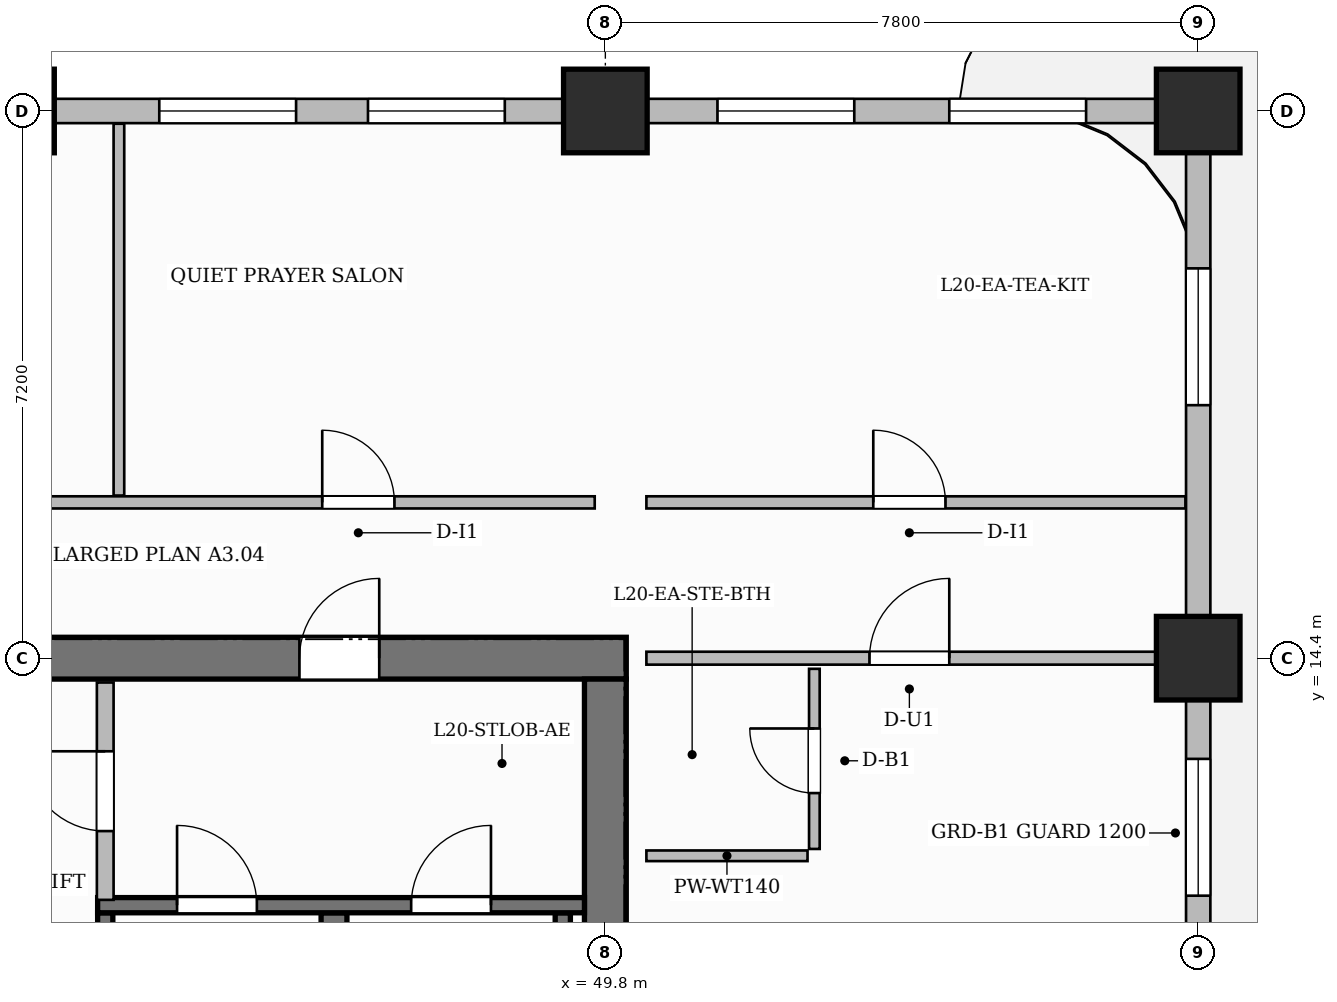
"""IFC4 building model, lengths in metres.
Left out: names, types, materials, properties, quantities, classifications, styles, units other than length and angle.
Written with IfcOpenShell. Run it as: python <this file> out.ifc"""

import sys

from ifc_helpers import new_model, si_unit, direction, frame, frame_2d, origin, origin_2d, place, context, subcontext, project, spatial, rectangle, extrude, source, transform, mapped, element, fill, save


model = new_model("IFC4")
c1 = context("Model", 3, precision=1e-05, world=origin(), true_north=direction((0.0, 1.0)))
c2 = subcontext(c1, "Body", "Model", "MODEL_VIEW")
j1 = project(units=[si_unit("LENGTHUNIT", "METRE"), si_unit("PLANEANGLEUNIT", "RADIAN")], contexts=[c1])
p1 = place(None, origin())
s1 = spatial("IfcSite", under=j1, at=p1, CompositionType="ELEMENT")
p2 = place(p1, origin())
s2 = spatial("IfcBuilding", under=s1, at=p2, CompositionType="ELEMENT")
p3 = place(p2, frame((0.0, 0.0, 84.2)))
s3 = spatial("IfcBuildingStorey", under=s2, at=p3, CompositionType="ELEMENT", Elevation=84.2)
p4 = place(p3, frame((34.525, 14.4, 0.0), z_axis=(0.0, 0.0, 1.0), x_axis=(1.0, 0.0, 0.0)))
e1 = element("IfcWall", 1, at=p4, inside=s3, PredefinedType="SHEAR", context=c2, shape_type="SweptSolid", body=[
    extrude(rectangle(XDim=15.55, YDim=0.55, at=frame_2d((7.775, 0.0))), origin(), (0.0, 0.0, 1.0), 3.7),
])
p5 = place(p4, frame((5.405, 0.0, 0.0)))
e2 = element("IfcOpeningElement", 2, at=p5, cuts=e1, PredefinedType="OPENING", context=c2, shape_type="SweptSolid", body=[
    extrude(rectangle(XDim=1.5, YDim=2.2, at=frame_2d((0.75, 1.1))), frame((0.0, 0.285, 0.0), z_axis=(0.0, -1.0, 0.0), x_axis=(1.0, 0.0, 0.0)), (0.0, 0.0, 1.0), 0.57),
])
p6 = place(p4, frame((1.62, 0.0, 0.0)))
e3 = element("IfcOpeningElement", 3, at=p6, cuts=e1, PredefinedType="OPENING", context=c2, shape_type="SweptSolid", body=[
    extrude(rectangle(XDim=1.05, YDim=2.15, at=frame_2d((0.525, 1.075))), frame((0.0, 0.285, 0.0), z_axis=(0.0, -1.0, 0.0), x_axis=(1.0, 0.0, 0.0)), (0.0, 0.0, 1.0), 0.57),
])
p7 = place(p4, frame((11.25, 0.0, 0.0)))
e4 = element("IfcOpeningElement", 4, at=p7, cuts=e1, PredefinedType="OPENING", context=c2, shape_type="SweptSolid", body=[
    extrude(rectangle(XDim=1.05, YDim=2.15, at=frame_2d((0.525, 1.075))), frame((0.0, 0.285, 0.0), z_axis=(0.0, -1.0, 0.0), x_axis=(1.0, 0.0, 0.0)), (0.0, 0.0, 1.0), 0.57),
])
p8 = place(p3, frame((49.8, 3.875, 0.0), z_axis=(0.0, 0.0, 1.0), x_axis=(0.0, 1.0, 0.0)))
e5 = element("IfcWall", 5, at=p8, inside=s3, PredefinedType="SHEAR", context=c2, shape_type="SweptSolid", body=[
    extrude(rectangle(XDim=10.25, YDim=0.55, at=frame_2d((5.125, 0.0))), origin(), (0.0, 0.0, 1.0), 3.7),
])
m1 = source(origin(), c2, "Body", "SweptSolid", [
    extrude(rectangle(XDim=1.1, YDim=1.1, at=origin_2d()), origin(), (0.0, 0.0, 1.0), 3.7),
])
for number, where, z_axis, x_axis in (
    (6, (42.0, 21.6, 0.0), (0.0, 0.0, 1.0), (1.0, 0.0, 0.0)),
    (7, (49.8, 21.6, 0.0), (0.0, 0.0, 1.0), (1.0, 0.0, 0.0)),
    (8, (57.6, 14.4, 0.0), (0.0, 0.0, 1.0), (1.0, 0.0, 0.0)),
    (9, (57.6, 21.6, 0.0), (0.0, 0.0, 1.0), (1.0, 0.0, 0.0)),
):
    element("IfcColumn", number, at=place(p3, frame(where, z_axis=z_axis, x_axis=x_axis)), inside=s3, PredefinedType="COLUMN", context=c2, shape_type="MappedRepresentation", body=[
        mapped(m1, transform((0.0, 0.0, 0.0), scale=1.0)),
    ])
p9 = place(p3, frame((43.22, 4.1, 0.0), z_axis=(0.0, 0.0, 1.0), x_axis=(0.0, 1.0, 0.0)))
e10 = element("IfcWall", 10, at=p9, inside=s3, PredefinedType="SHEAR", context=c2, shape_type="SweptSolid", body=[
    extrude(rectangle(XDim=6.95, YDim=0.2, at=frame_2d((3.475, 0.0))), origin(), (0.0, 0.0, 1.0), 3.7),
])
p10 = place(p3, frame((46.23, 4.1, 0.0), z_axis=(0.0, 0.0, 1.0), x_axis=(0.0, 1.0, 0.0)))
e11 = element("IfcWall", 11, at=p10, inside=s3, PredefinedType="SHEAR", context=c2, shape_type="SweptSolid", body=[
    extrude(rectangle(XDim=6.95, YDim=0.34, at=frame_2d((3.475, 0.0))), origin(), (0.0, 0.0, 1.0), 3.7),
])
p11 = place(p3, frame((49.24, 4.1, 0.0), z_axis=(0.0, 0.0, 1.0), x_axis=(0.0, 1.0, 0.0)))
e12 = element("IfcWall", 12, at=p11, inside=s3, PredefinedType="SHEAR", context=c2, shape_type="SweptSolid", body=[
    extrude(rectangle(XDim=6.95, YDim=0.2, at=frame_2d((3.475, 0.0))), origin(), (0.0, 0.0, 1.0), 3.7),
])
p12 = place(p3, frame((43.12, 11.15, 0.0), z_axis=(0.0, 0.0, 1.0), x_axis=(1.0, 0.0, 0.0)))
e13 = element("IfcWall", 13, at=p12, inside=s3, PredefinedType="SHEAR", context=c2, shape_type="SweptSolid", body=[
    extrude(rectangle(XDim=6.405, YDim=0.2, at=frame_2d((3.202, 0.0))), origin(), (0.0, 0.0, 1.0), 3.7),
])
p13 = place(p12, frame((1.045, 0.0, 0.0)))
e14 = element("IfcOpeningElement", 14, at=p13, cuts=e13, PredefinedType="OPENING", context=c2, shape_type="SweptSolid", body=[
    extrude(rectangle(XDim=1.05, YDim=2.2, at=frame_2d((0.525, 1.1))), frame((0.0, 0.11, 0.0), z_axis=(0.0, -1.0, 0.0), x_axis=(1.0, 0.0, 0.0)), (0.0, 0.0, 1.0), 0.22),
])
p14 = place(p12, frame((4.125, 0.0, 0.0)))
e15 = element("IfcOpeningElement", 15, at=p14, cuts=e13, PredefinedType="OPENING", context=c2, shape_type="SweptSolid", body=[
    extrude(rectangle(XDim=1.05, YDim=2.2, at=frame_2d((0.525, 1.1))), frame((0.0, 0.11, 0.0), z_axis=(0.0, -1.0, 0.0), x_axis=(1.0, 0.0, 0.0)), (0.0, 0.0, 1.0), 0.22),
])
p15 = place(p3, frame((43.22, 11.22, 0.0), z_axis=(0.0, 0.0, 1.0), x_axis=(0.0, 1.0, 0.0)))
e16 = element("IfcWall", 16, at=p15, inside=s3, PredefinedType="PARTITIONING", context=c2, shape_type="SweptSolid", body=[
    extrude(rectangle(XDim=2.86, YDim=0.22, at=frame_2d((1.43, 0.0))), origin(), (0.0, 0.0, 1.0), 3.45),
])
p16 = place(p15, frame((0.905, 0.0, 0.0)))
e17 = element("IfcOpeningElement", 17, at=p16, cuts=e16, PredefinedType="OPENING", context=c2, shape_type="SweptSolid", body=[
    extrude(rectangle(XDim=1.05, YDim=2.15, at=frame_2d((0.525, 1.075))), frame((0.0, 0.12, 0.0), z_axis=(0.0, -1.0, 0.0), x_axis=(1.0, 0.0, 0.0)), (0.0, 0.0, 1.0), 0.24),
])
p17 = place(p3, frame((32.19, 16.45, 0.0), z_axis=(0.0, 0.0, 1.0), x_axis=(1.0, 0.0, 0.0)))
e18 = element("IfcWall", 18, at=p17, inside=s3, PredefinedType="PARTITIONING", context=c2, shape_type="SweptSolid", body=[
    extrude(rectangle(XDim=17.47, YDim=0.16, at=frame_2d((8.735, 0.0))), origin(), (0.0, 0.0, 1.0), 3.45),
])
p18 = place(p17, frame((1.235, 0.0, 0.0)))
e19 = element("IfcOpeningElement", 19, at=p18, cuts=e18, PredefinedType="OPENING", context=c2, shape_type="SweptSolid", body=[
    extrude(rectangle(XDim=0.85, YDim=2.1, at=frame_2d((0.425, 1.05))), frame((0.0, 0.09, 0.0), z_axis=(0.0, -1.0, 0.0), x_axis=(1.0, 0.0, 0.0)), (0.0, 0.0, 1.0), 0.18),
])
p19 = place(p17, frame((6.61, 0.0, 0.0)))
e20 = element("IfcOpeningElement", 20, at=p19, cuts=e18, PredefinedType="OPENING", context=c2, shape_type="SweptSolid", body=[
    extrude(rectangle(XDim=1.4, YDim=2.35, at=frame_2d((0.7, 1.175))), frame((0.0, 0.09, 0.0), z_axis=(0.0, -1.0, 0.0), x_axis=(1.0, 0.0, 0.0)), (0.0, 0.0, 1.0), 0.18),
])
p20 = place(p17, frame((13.885, 0.0, 0.0)))
e21 = element("IfcOpeningElement", 21, at=p20, cuts=e18, PredefinedType="OPENING", context=c2, shape_type="SweptSolid", body=[
    extrude(rectangle(XDim=0.95, YDim=2.15, at=frame_2d((0.475, 1.075))), frame((0.0, 0.09, 0.0), z_axis=(0.0, -1.0, 0.0), x_axis=(1.0, 0.0, 0.0)), (0.0, 0.0, 1.0), 0.18),
])
p21 = place(p3, frame((50.34, 14.4, 0.0), z_axis=(0.0, 0.0, 1.0), x_axis=(1.0, 0.0, 0.0)))
e22 = element("IfcWall", 22, at=p21, inside=s3, PredefinedType="PARTITIONING", context=c2, shape_type="SweptSolid", body=[
    extrude(rectangle(XDim=7.07, YDim=0.17, at=frame_2d((3.535, 0.0))), origin(), (0.0, 0.0, 1.0), 2.885),
])
p22 = place(p21, frame((2.935, 0.0, 0.0)))
e23 = element("IfcOpeningElement", 23, at=p22, cuts=e22, PredefinedType="OPENING", context=c2, shape_type="SweptSolid", body=[
    extrude(rectangle(XDim=1.05, YDim=2.25, at=frame_2d((0.525, 1.125))), frame((0.0, 0.095, 0.0), z_axis=(0.0, -1.0, 0.0), x_axis=(1.0, 0.0, 0.0)), (0.0, 0.0, 1.0), 0.19),
])
p23 = place(p3, frame((50.34, 16.45, 0.0), z_axis=(0.0, 0.0, 1.0), x_axis=(1.0, 0.0, 0.0)))
e24 = element("IfcWall", 24, at=p23, inside=s3, PredefinedType="PARTITIONING", context=c2, shape_type="SweptSolid", body=[
    extrude(rectangle(XDim=7.092, YDim=0.16, at=frame_2d((3.546, 0.0))), origin(), (0.0, 0.0, 1.0), 3.45),
])
p24 = place(p23, frame((2.985, 0.0, 0.0)))
e25 = element("IfcOpeningElement", 25, at=p24, cuts=e24, PredefinedType="OPENING", context=c2, shape_type="SweptSolid", body=[
    extrude(rectangle(XDim=0.95, YDim=2.15, at=frame_2d((0.475, 1.075))), frame((0.0, 0.09, 0.0), z_axis=(0.0, -1.0, 0.0), x_axis=(1.0, 0.0, 0.0)), (0.0, 0.0, 1.0), 0.18),
])
p25 = place(p3, frame((52.55, 11.89, 0.0), z_axis=(0.0, 0.0, 1.0), x_axis=(0.0, 1.0, 0.0)))
e26 = element("IfcWall", 26, at=p25, inside=s3, PredefinedType="PARTITIONING", context=c2, shape_type="SweptSolid", body=[
    extrude(rectangle(XDim=2.37, YDim=0.14, at=frame_2d((1.185, 0.0))), origin(), (0.0, 0.0, 1.0), 3.45),
])
p26 = place(p25, frame((0.735, 0.0, 0.0)))
e27 = element("IfcOpeningElement", 27, at=p26, cuts=e26, PredefinedType="OPENING", context=c2, shape_type="SweptSolid", body=[
    extrude(rectangle(XDim=0.85, YDim=2.1, at=frame_2d((0.425, 1.05))), frame((0.0, 0.08, 0.0), z_axis=(0.0, -1.0, 0.0), x_axis=(1.0, 0.0, 0.0)), (0.0, 0.0, 1.0), 0.16),
])
p27 = place(p3, frame((50.34, 11.8, 0.0), z_axis=(0.0, 0.0, 1.0), x_axis=(1.0, 0.0, 0.0)))
e28 = element("IfcWall", 28, at=p27, inside=s3, PredefinedType="PARTITIONING", context=c2, shape_type="SweptSolid", body=[
    extrude(rectangle(XDim=2.12, YDim=0.14, at=frame_2d((1.06, 0.0))), origin(), (0.0, 0.0, 1.0), 3.45),
])
p28 = place(p3, frame((43.4, 16.54, 0.0), z_axis=(0.0, 0.0, 1.0), x_axis=(0.0, 1.0, 0.0)))
e29 = element("IfcWall", 29, at=p28, inside=s3, PredefinedType="PARTITIONING", context=c2, shape_type="SweptSolid", body=[
    extrude(rectangle(XDim=4.892, YDim=0.14, at=frame_2d((2.446, 0.0))), origin(), (0.0, 0.0, 1.0), 3.45),
])
p29 = place(p3, frame((57.6, 0.05, 0.0), z_axis=(0.0, 0.0, 1.0), x_axis=(0.0, 1.0, 0.0)))
e30 = element("IfcWall", 30, at=p29, inside=s3, PredefinedType="SOLIDWALL", context=c2, shape_type="SweptSolid", body=[
    extrude(rectangle(XDim=21.5, YDim=0.32, at=frame_2d((10.75, 0.0))), origin(), (0.0, 0.0, 1.0), 2.885),
])
p30 = place(p29, frame((3.4, 0.0, 0.0)))
e31 = element("IfcOpeningElement", 31, at=p30, cuts=e30, PredefinedType="OPENING", context=c2, shape_type="SweptSolid", body=[
    extrude(rectangle(XDim=1.2, YDim=2.2, at=frame_2d((0.6, 1.1))), frame((0.0, 0.17, 0.0), z_axis=(0.0, -1.0, 0.0), x_axis=(1.0, 0.0, 0.0)), (0.0, 0.0, 1.0), 0.34),
])
p31 = place(p29, frame((1.225, 0.0, 0.8)))
e32 = element("IfcOpeningElement", 32, at=p31, cuts=e30, PredefinedType="OPENING", context=c2, shape_type="SweptSolid", body=[
    extrude(rectangle(XDim=1.4, YDim=1.85, at=frame_2d((0.7, 0.925))), frame((0.0, 0.17, 0.0), z_axis=(0.0, -1.0, 0.0), x_axis=(1.0, 0.0, 0.0)), (0.0, 0.0, 1.0), 0.34),
])
p32 = place(p29, frame((5.15, 0.0, 0.8)))
e33 = element("IfcOpeningElement", 33, at=p32, cuts=e30, PredefinedType="OPENING", context=c2, shape_type="SweptSolid", body=[
    extrude(rectangle(XDim=0.95, YDim=1.75, at=frame_2d((0.475, 0.875))), frame((0.0, 0.17, 0.0), z_axis=(0.0, -1.0, 0.0), x_axis=(1.0, 0.0, 0.0)), (0.0, 0.0, 1.0), 0.34),
])
p33 = place(p29, frame((8.475, 0.0, 0.8)))
e34 = element("IfcOpeningElement", 34, at=p33, cuts=e30, PredefinedType="OPENING", context=c2, shape_type="SweptSolid", body=[
    extrude(rectangle(XDim=1.8, YDim=1.85, at=frame_2d((0.9, 0.925))), frame((0.0, 0.17, 0.0), z_axis=(0.0, -1.0, 0.0), x_axis=(1.0, 0.0, 0.0)), (0.0, 0.0, 1.0), 0.34),
])
p34 = place(p29, frame((11.225, 0.0, 0.8)))
e35 = element("IfcOpeningElement", 35, at=p34, cuts=e30, PredefinedType="OPENING", context=c2, shape_type="SweptSolid", body=[
    extrude(rectangle(XDim=1.8, YDim=1.85, at=frame_2d((0.9, 0.925))), frame((0.0, 0.17, 0.0), z_axis=(0.0, -1.0, 0.0), x_axis=(1.0, 0.0, 0.0)), (0.0, 0.0, 1.0), 0.34),
])
p35 = place(p29, frame((17.679, 0.0, 0.8)))
e36 = element("IfcOpeningElement", 36, at=p35, cuts=e30, PredefinedType="OPENING", context=c2, shape_type="SweptSolid", body=[
    extrude(rectangle(XDim=1.8, YDim=1.85, at=frame_2d((0.9, 0.925))), frame((0.0, 0.17, 0.0), z_axis=(0.0, -1.0, 0.0), x_axis=(1.0, 0.0, 0.0)), (0.0, 0.0, 1.0), 0.34),
])
p36 = place(p3, frame((34.8, 21.6, 0.0), z_axis=(0.0, 0.0, 1.0), x_axis=(1.0, 0.0, 0.0)))
e37 = element("IfcWall", 37, at=p36, inside=s3, PredefinedType="SOLIDWALL", context=c2, shape_type="SweptSolid", body=[
    extrude(rectangle(XDim=22.8, YDim=0.32, at=frame_2d((11.4, 0.0))), origin(), (0.0, 0.0, 1.0), 2.885),
])
p37 = place(p36, frame((1.331, 0.0, 0.8)))
e38 = element("IfcOpeningElement", 38, at=p37, cuts=e37, PredefinedType="OPENING", context=c2, shape_type="SweptSolid", body=[
    extrude(rectangle(XDim=1.8, YDim=1.85, at=frame_2d((0.9, 0.925))), frame((0.0, 0.17, 0.0), z_axis=(0.0, -1.0, 0.0), x_axis=(1.0, 0.0, 0.0)), (0.0, 0.0, 1.0), 0.34),
])
p38 = place(p36, frame((4.077, 0.0, 0.8)))
e39 = element("IfcOpeningElement", 39, at=p38, cuts=e37, PredefinedType="OPENING", context=c2, shape_type="SweptSolid", body=[
    extrude(rectangle(XDim=1.8, YDim=1.85, at=frame_2d((0.9, 0.925))), frame((0.0, 0.17, 0.0), z_axis=(0.0, -1.0, 0.0), x_axis=(1.0, 0.0, 0.0)), (0.0, 0.0, 1.0), 0.34),
])
p39 = place(p36, frame((9.131, 0.0, 0.8)))
e40 = element("IfcOpeningElement", 40, at=p39, cuts=e37, PredefinedType="OPENING", context=c2, shape_type="SweptSolid", body=[
    extrude(rectangle(XDim=1.8, YDim=1.85, at=frame_2d((0.9, 0.925))), frame((0.0, 0.17, 0.0), z_axis=(0.0, -1.0, 0.0), x_axis=(1.0, 0.0, 0.0)), (0.0, 0.0, 1.0), 0.34),
])
p40 = place(p36, frame((11.877, 0.0, 0.8)))
e41 = element("IfcOpeningElement", 41, at=p40, cuts=e37, PredefinedType="OPENING", context=c2, shape_type="SweptSolid", body=[
    extrude(rectangle(XDim=1.8, YDim=1.85, at=frame_2d((0.9, 0.925))), frame((0.0, 0.17, 0.0), z_axis=(0.0, -1.0, 0.0), x_axis=(1.0, 0.0, 0.0)), (0.0, 0.0, 1.0), 0.34),
])
p41 = place(p36, frame((16.475, 0.0, 0.8)))
e42 = element("IfcOpeningElement", 42, at=p41, cuts=e37, PredefinedType="OPENING", context=c2, shape_type="SweptSolid", body=[
    extrude(rectangle(XDim=1.8, YDim=1.85, at=frame_2d((0.9, 0.925))), frame((0.0, 0.17, 0.0), z_axis=(0.0, -1.0, 0.0), x_axis=(1.0, 0.0, 0.0)), (0.0, 0.0, 1.0), 0.34),
])
p42 = place(p36, frame((19.525, 0.0, 0.8)))
e43 = element("IfcOpeningElement", 43, at=p42, cuts=e37, PredefinedType="OPENING", context=c2, shape_type="SweptSolid", body=[
    extrude(rectangle(XDim=1.8, YDim=1.85, at=frame_2d((0.9, 0.925))), frame((0.0, 0.17, 0.0), z_axis=(0.0, -1.0, 0.0), x_axis=(1.0, 0.0, 0.0)), (0.0, 0.0, 1.0), 0.34),
])
m2 = source(origin(), c2, "Body", "SweptSolid", [
    extrude(rectangle(XDim=1.05, YDim=2.2, at=frame_2d((0.525, 1.1))), frame((0.0, 0.025, 0.0), z_axis=(0.0, -1.0, 0.0), x_axis=(1.0, 0.0, 0.0)), (0.0, 0.0, 1.0), 0.05),
])
p43 = place(p13, origin())
e44 = element("IfcDoor", 44, at=p43, inside=s3, OperationType="SINGLE_SWING_LEFT", PredefinedType="DOOR", context=c2, shape_type="MappedRepresentation", body=[
    mapped(m2, transform((0.0, 0.0, 0.0), scale=1.0)),
])
fill(e14, e44)
p44 = place(p14, origin())
e45 = element("IfcDoor", 45, at=p44, inside=s3, OperationType="SINGLE_SWING_RIGHT", PredefinedType="DOOR", context=c2, shape_type="MappedRepresentation", body=[
    mapped(m2, transform((0.0, 0.0, 0.0), scale=1.0)),
])
fill(e15, e45)
m3 = source(origin(), c2, "Body", "SweptSolid", [
    extrude(rectangle(XDim=1.05, YDim=2.15, at=frame_2d((0.525, 1.075))), frame((0.0, 0.025, 0.0), z_axis=(0.0, -1.0, 0.0), x_axis=(1.0, 0.0, 0.0)), (0.0, 0.0, 1.0), 0.05),
])
p45 = place(p16, origin())
e46 = element("IfcDoor", 46, at=p45, inside=s3, OperationType="SINGLE_SWING_RIGHT", PredefinedType="DOOR", context=c2, shape_type="MappedRepresentation", body=[
    mapped(m3, transform((0.0, 0.0, 0.0), scale=1.0)),
])
fill(e17, e46)
p46 = place(p7, origin())
e47 = element("IfcDoor", 47, at=p46, inside=s3, OperationType="SINGLE_SWING_RIGHT", PredefinedType="DOOR", context=c2, shape_type="MappedRepresentation", body=[
    mapped(m3, transform((0.0, 0.0, 0.0), scale=1.0)),
])
fill(e4, e47)
m4 = source(origin(), c2, "Body", "SweptSolid", [
    extrude(rectangle(XDim=1.05, YDim=2.25, at=frame_2d((0.525, 1.125))), frame((0.0, 0.025, 0.0), z_axis=(0.0, -1.0, 0.0), x_axis=(1.0, 0.0, 0.0)), (0.0, 0.0, 1.0), 0.05),
])
p47 = place(p22, origin())
e48 = element("IfcDoor", 48, at=p47, inside=s3, OperationType="SINGLE_SWING_RIGHT", PredefinedType="DOOR", context=c2, shape_type="MappedRepresentation", body=[
    mapped(m4, transform((0.0, 0.0, 0.0), scale=1.0)),
])
fill(e23, e48)
m5 = source(origin(), c2, "Body", "SweptSolid", [
    extrude(rectangle(XDim=0.95, YDim=2.15, at=frame_2d((0.475, 1.075))), frame((0.0, 0.025, 0.0), z_axis=(0.0, -1.0, 0.0), x_axis=(1.0, 0.0, 0.0)), (0.0, 0.0, 1.0), 0.05),
])
p48 = place(p24, origin())
e49 = element("IfcDoor", 49, at=p48, inside=s3, OperationType="SINGLE_SWING_LEFT", PredefinedType="DOOR", context=c2, shape_type="MappedRepresentation", body=[
    mapped(m5, transform((0.0, 0.0, 0.0), scale=1.0)),
])
fill(e25, e49)
m6 = source(origin(), c2, "Body", "SweptSolid", [
    extrude(rectangle(XDim=0.85, YDim=2.1, at=frame_2d((0.425, 1.05))), frame((0.0, 0.025, 0.0), z_axis=(0.0, -1.0, 0.0), x_axis=(1.0, 0.0, 0.0)), (0.0, 0.0, 1.0), 0.05),
])
p49 = place(p26, origin())
e50 = element("IfcDoor", 50, at=p49, inside=s3, OperationType="SINGLE_SWING_RIGHT", PredefinedType="DOOR", context=c2, shape_type="MappedRepresentation", body=[
    mapped(m6, transform((0.0, 0.0, 0.0), scale=1.0)),
])
fill(e27, e50)
p50 = place(p20, origin())
e51 = element("IfcDoor", 51, at=p50, inside=s3, OperationType="SINGLE_SWING_LEFT", PredefinedType="DOOR", context=c2, shape_type="MappedRepresentation", body=[
    mapped(m5, transform((0.0, 0.0, 0.0), scale=1.0)),
])
fill(e21, e51)
m7 = source(origin(), c2, "Body", "SweptSolid", [
    extrude(rectangle(XDim=1.8, YDim=1.85, at=frame_2d((0.9, 0.925))), frame((0.0, 0.03, 0.0), z_axis=(0.0, -1.0, 0.0), x_axis=(1.0, 0.0, 0.0)), (0.0, 0.0, 1.0), 0.06),
])
p51 = place(p34, origin())
e52 = element("IfcWindow", 52, at=p51, inside=s3, PartitioningType="DOUBLE_PANEL_VERTICAL", PredefinedType="WINDOW", context=c2, shape_type="MappedRepresentation", body=[
    mapped(m7, transform((0.0, 0.0, 0.0), scale=1.0)),
])
fill(e35, e52)
p52 = place(p35, origin())
e53 = element("IfcWindow", 53, at=p52, inside=s3, PartitioningType="DOUBLE_PANEL_VERTICAL", PredefinedType="WINDOW", context=c2, shape_type="MappedRepresentation", body=[
    mapped(m7, transform((0.0, 0.0, 0.0), scale=1.0)),
])
fill(e36, e53)
p53 = place(p39, origin())
e54 = element("IfcWindow", 54, at=p53, inside=s3, PartitioningType="DOUBLE_PANEL_VERTICAL", PredefinedType="WINDOW", context=c2, shape_type="MappedRepresentation", body=[
    mapped(m7, transform((0.0, 0.0, 0.0), scale=1.0)),
])
fill(e40, e54)
p54 = place(p40, origin())
e55 = element("IfcWindow", 55, at=p54, inside=s3, PartitioningType="DOUBLE_PANEL_VERTICAL", PredefinedType="WINDOW", context=c2, shape_type="MappedRepresentation", body=[
    mapped(m7, transform((0.0, 0.0, 0.0), scale=1.0)),
])
fill(e41, e55)
p55 = place(p41, origin())
e56 = element("IfcWindow", 56, at=p55, inside=s3, PartitioningType="DOUBLE_PANEL_VERTICAL", PredefinedType="WINDOW", context=c2, shape_type="MappedRepresentation", body=[
    mapped(m7, transform((0.0, 0.0, 0.0), scale=1.0)),
])
fill(e42, e56)
p56 = place(p42, origin())
e57 = element("IfcWindow", 57, at=p56, inside=s3, PartitioningType="DOUBLE_PANEL_VERTICAL", PredefinedType="WINDOW", context=c2, shape_type="MappedRepresentation", body=[
    mapped(m7, transform((0.0, 0.0, 0.0), scale=1.0)),
])
fill(e43, e57)
save(model, sys.argv[1])
